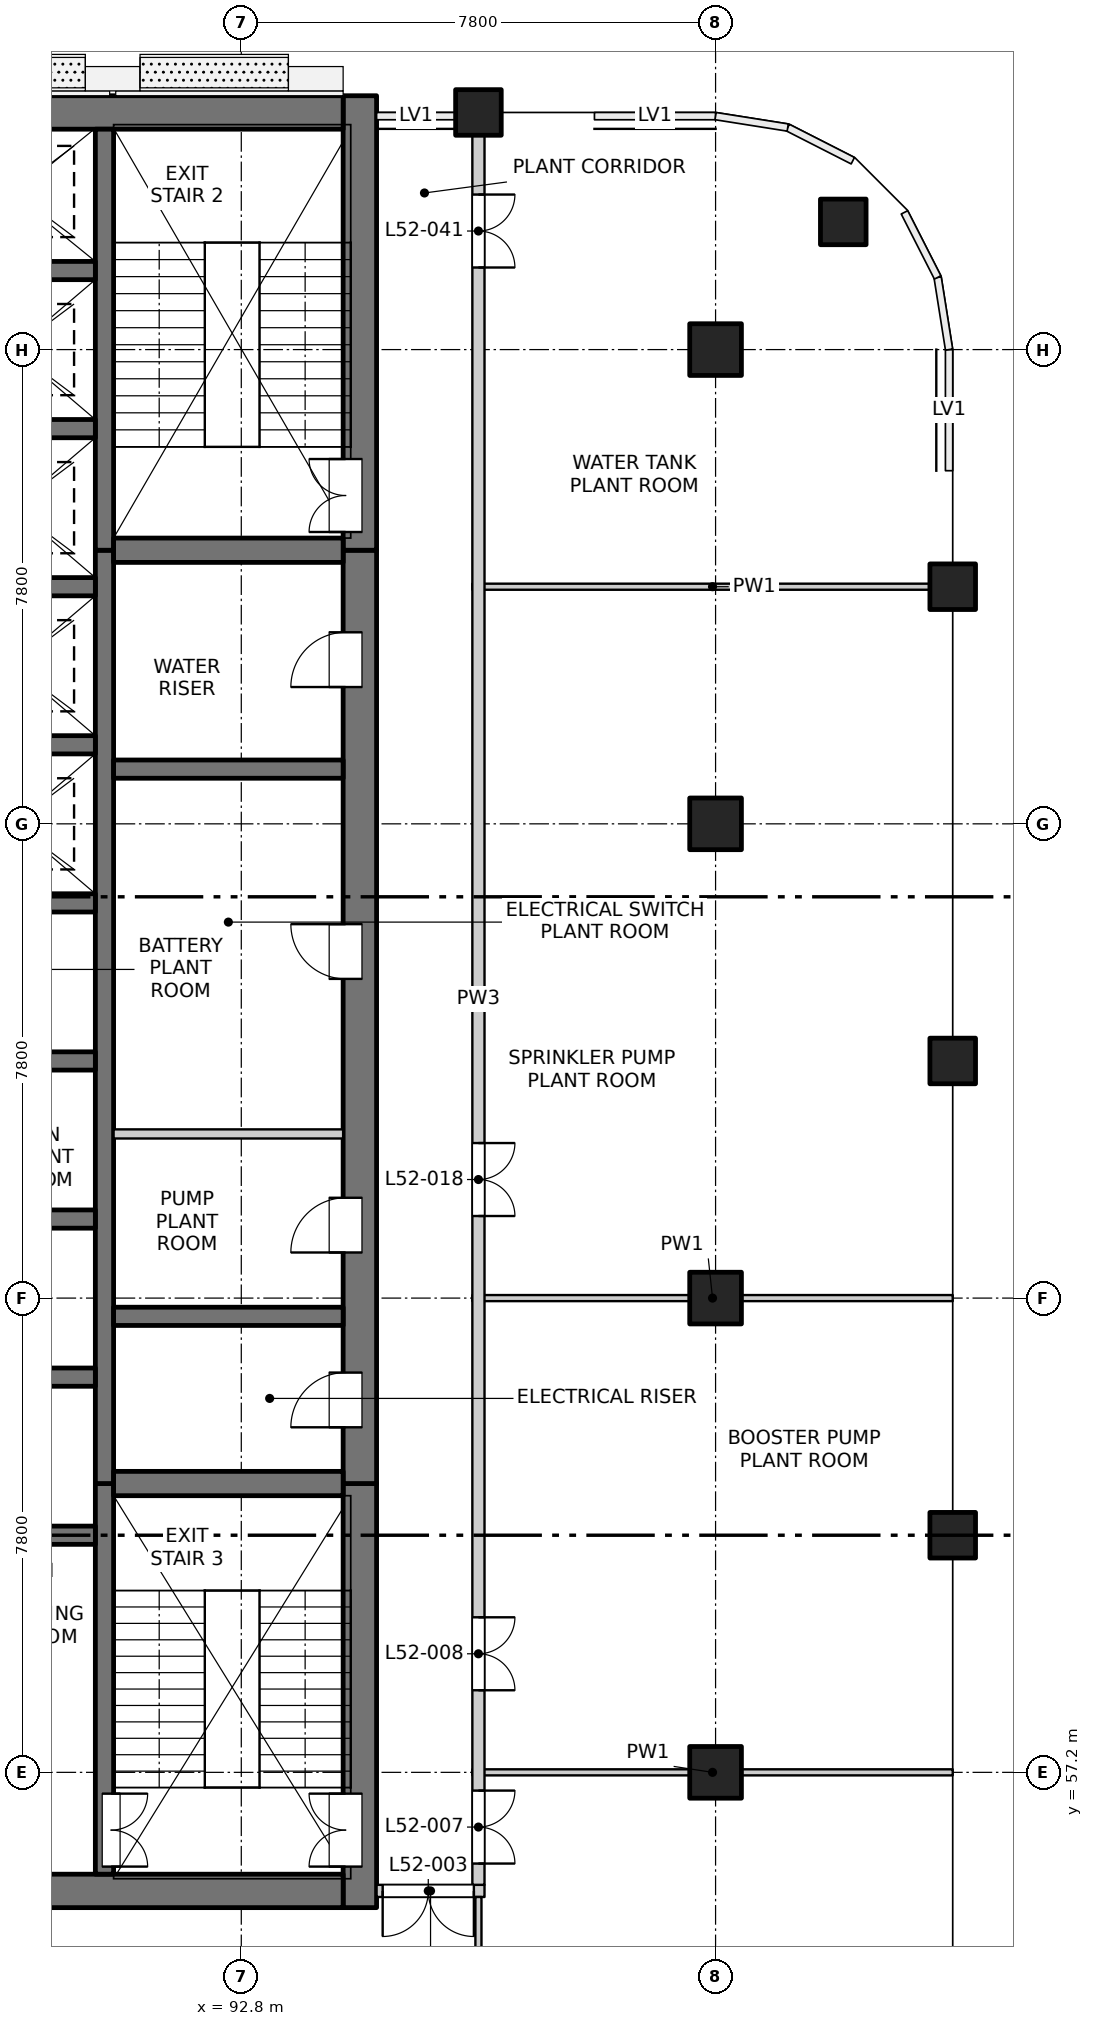
"""IFC4 building model, lengths in metres.
Left out: names, types, materials, properties, quantities, classifications, styles, units other than length and angle.
Written with IfcOpenShell. Run it as: python <this file> out.ifc"""

import sys

from ifc_helpers import new_model, si_unit, direction, frame, frame_2d, origin, origin_2d, place, context, subcontext, project, spatial, rectangle, extrude, element, fill, save


model = new_model("IFC4")
c1 = context("Model", 3, precision=1e-05, world=origin(), true_north=direction((0.0, 1.0)))
c2 = subcontext(c1, "Body", "Model", "MODEL_VIEW")
j1 = project(units=[si_unit("LENGTHUNIT", "METRE"), si_unit("PLANEANGLEUNIT", "RADIAN")], contexts=[c1])
p1 = place(None, origin())
s1 = spatial("IfcSite", under=j1, at=p1, CompositionType="ELEMENT")
p2 = place(p1, origin())
s2 = spatial("IfcBuilding", under=s1, at=p2, CompositionType="ELEMENT")
p3 = place(p2, frame((0.0, 0.0, 192.8)))
s3 = spatial("IfcBuildingStorey", under=s2, at=p3, CompositionType="ELEMENT", Elevation=192.8)
for number, where, z_axis, x_axis in (
    (1, (102.7, 82.7, -0.3), (0.0, 0.0, 1.0), (1.0, 0.0, 0.0)),
    (2, (104.5, 61.1, -0.3), (0.0, 0.0, 1.0), (1.0, 0.0, 0.0)),
    (3, (104.5, 68.9, -0.3), (0.0, 0.0, 1.0), (1.0, 0.0, 0.0)),
    (4, (104.5, 76.7, -0.3), (0.0, 0.0, 1.0), (1.0, 0.0, 0.0)),
    (5, (96.7, 84.5, -0.3), (0.0, 0.0, 1.0), (1.0, 0.0, 0.0)),
):
    element("IfcColumn", number, at=place(p3, frame(where, z_axis=z_axis, x_axis=x_axis)), inside=s3, PredefinedType="COLUMN", context=c2, shape_type="SweptSolid", body=[
        extrude(rectangle(XDim=0.75, YDim=0.75, at=origin_2d()), origin(), (0.0, 0.0, 1.0), 4.5),
    ])
for number, where, z_axis, x_axis in (
    (6, (100.6, 57.2, -0.3), (0.0, 0.0, 1.0), (1.0, 0.0, 0.0)),
    (7, (100.6, 65.0, -0.3), (0.0, 0.0, 1.0), (1.0, 0.0, 0.0)),
    (8, (100.6, 72.8, -0.3), (0.0, 0.0, 1.0), (1.0, 0.0, 0.0)),
    (9, (100.6, 80.6, -0.3), (0.0, 0.0, 1.0), (1.0, 0.0, 0.0)),
):
    element("IfcColumn", number, at=place(p3, frame(where, z_axis=z_axis, x_axis=x_axis)), inside=s3, PredefinedType="COLUMN", context=c2, shape_type="SweptSolid", body=[
        extrude(rectangle(XDim=0.85, YDim=0.85, at=origin_2d()), origin(), (0.0, 0.0, 1.0), 4.5),
    ])
p4 = place(p3, frame((94.75, 54.975, -0.3), z_axis=(0.0, 0.0, 1.0), x_axis=(0.0, 1.0, 0.0)))
e10 = element("IfcWall", 10, at=p4, inside=s3, PredefinedType="SOLIDWALL", context=c2, shape_type="SweptSolid", body=[
    extrude(rectangle(XDim=6.975, YDim=0.55, at=frame_2d((3.487, 0.0))), origin(), (0.0, 0.0, 1.0), 4.5),
])
p5 = place(p4, frame((0.675, 0.0, 0.3)))
e11 = element("IfcOpeningElement", 11, at=p5, cuts=e10, PredefinedType="OPENING", context=c2, shape_type="SweptSolid", body=[
    extrude(rectangle(XDim=1.2, YDim=2.1, at=frame_2d((0.6, 1.05))), frame((0.0, 0.285, 0.0), z_axis=(0.0, -1.0, 0.0), x_axis=(1.0, 0.0, 0.0)), (0.0, 0.0, 1.0), 0.57),
])
p6 = place(p3, frame((94.75, 61.95, -0.3), z_axis=(0.0, 0.0, 1.0), x_axis=(0.0, 1.0, 0.0)))
e12 = element("IfcWall", 12, at=p6, inside=s3, PredefinedType="SOLIDWALL", context=c2, shape_type="SweptSolid", body=[
    extrude(rectangle(XDim=15.35, YDim=0.55, at=frame_2d((7.675, 0.0))), origin(), (0.0, 0.0, 1.0), 4.5),
])
p7 = place(p6, frame((0.925, 0.0, 0.3)))
e13 = element("IfcOpeningElement", 13, at=p7, cuts=e12, PredefinedType="OPENING", context=c2, shape_type="SweptSolid", body=[
    extrude(rectangle(XDim=0.9, YDim=2.1, at=frame_2d((0.45, 1.05))), frame((0.0, 0.285, 0.0), z_axis=(0.0, -1.0, 0.0), x_axis=(1.0, 0.0, 0.0)), (0.0, 0.0, 1.0), 0.57),
])
p8 = place(p6, frame((3.8, 0.0, 0.3)))
e14 = element("IfcOpeningElement", 14, at=p8, cuts=e12, PredefinedType="OPENING", context=c2, shape_type="SweptSolid", body=[
    extrude(rectangle(XDim=0.9, YDim=2.1, at=frame_2d((0.45, 1.05))), frame((0.0, 0.285, 0.0), z_axis=(0.0, -1.0, 0.0), x_axis=(1.0, 0.0, 0.0)), (0.0, 0.0, 1.0), 0.57),
])
p9 = place(p6, frame((8.3, 0.0, 0.3)))
e15 = element("IfcOpeningElement", 15, at=p9, cuts=e12, PredefinedType="OPENING", context=c2, shape_type="SweptSolid", body=[
    extrude(rectangle(XDim=0.9, YDim=2.1, at=frame_2d((0.45, 1.05))), frame((0.0, 0.285, 0.0), z_axis=(0.0, -1.0, 0.0), x_axis=(1.0, 0.0, 0.0)), (0.0, 0.0, 1.0), 0.57),
])
p10 = place(p6, frame((13.1, 0.0, 0.3)))
e16 = element("IfcOpeningElement", 16, at=p10, cuts=e12, PredefinedType="OPENING", context=c2, shape_type="SweptSolid", body=[
    extrude(rectangle(XDim=0.9, YDim=2.1, at=frame_2d((0.45, 1.05))), frame((0.0, 0.285, 0.0), z_axis=(0.0, -1.0, 0.0), x_axis=(1.0, 0.0, 0.0)), (0.0, 0.0, 1.0), 0.57),
])
p11 = place(p3, frame((94.75, 77.3, -0.3), z_axis=(0.0, 0.0, 1.0), x_axis=(0.0, 1.0, 0.0)))
e17 = element("IfcWall", 17, at=p11, inside=s3, PredefinedType="SOLIDWALL", context=c2, shape_type="SweptSolid", body=[
    extrude(rectangle(XDim=7.475, YDim=0.55, at=frame_2d((3.737, 0.0))), origin(), (0.0, 0.0, 1.0), 4.5),
])
p12 = place(p11, frame((0.3, 0.0, 0.3)))
e18 = element("IfcOpeningElement", 18, at=p12, cuts=e17, PredefinedType="OPENING", context=c2, shape_type="SweptSolid", body=[
    extrude(rectangle(XDim=1.2, YDim=2.1, at=frame_2d((0.6, 1.05))), frame((0.0, 0.285, 0.0), z_axis=(0.0, -1.0, 0.0), x_axis=(1.0, 0.0, 0.0)), (0.0, 0.0, 1.0), 0.57),
])
p13 = place(p3, frame((75.525, 55.25, -0.3), z_axis=(0.0, 0.0, 1.0), x_axis=(1.0, 0.0, 0.0)))
e19 = element("IfcWall", 19, at=p13, inside=s3, PredefinedType="SOLIDWALL", context=c2, shape_type="SweptSolid", body=[
    extrude(rectangle(XDim=18.95, YDim=0.55, at=frame_2d((9.475, 0.0))), origin(), (0.0, 0.0, 1.0), 4.5),
])
p14 = place(p13, frame((7.225, 0.0, 0.3)))
e20 = element("IfcOpeningElement", 20, at=p14, cuts=e19, PredefinedType="OPENING", context=c2, shape_type="SweptSolid", body=[
    extrude(rectangle(XDim=1.5, YDim=2.1, at=frame_2d((0.75, 1.05))), frame((0.0, 0.285, 0.0), z_axis=(0.0, -1.0, 0.0), x_axis=(1.0, 0.0, 0.0)), (0.0, 0.0, 1.0), 0.57),
])
p15 = place(p3, frame((75.525, 84.5, -0.3), z_axis=(0.0, 0.0, 1.0), x_axis=(1.0, 0.0, 0.0)))
e21 = element("IfcWall", 21, at=p15, inside=s3, PredefinedType="SOLIDWALL", context=c2, shape_type="SweptSolid", body=[
    extrude(rectangle(XDim=18.95, YDim=0.55, at=frame_2d((9.475, 0.0))), origin(), (0.0, 0.0, 1.0), 4.5),
])
p16 = place(p3, frame((90.55, 55.525, -0.3), z_axis=(0.0, 0.0, 1.0), x_axis=(0.0, 1.0, 0.0)))
e22 = element("IfcWall", 22, at=p16, inside=s3, PredefinedType="SOLIDWALL", context=c2, shape_type="SweptSolid", body=[
    extrude(rectangle(XDim=6.425, YDim=0.3, at=frame_2d((3.212, 0.0))), origin(), (0.0, 0.0, 1.0), 4.5),
])
p17 = place(p16, frame((0.125, 0.0, 0.3)))
e23 = element("IfcOpeningElement", 23, at=p17, cuts=e22, PredefinedType="OPENING", context=c2, shape_type="SweptSolid", body=[
    extrude(rectangle(XDim=1.2, YDim=2.1, at=frame_2d((0.6, 1.05))), frame((0.0, 0.16, 0.0), z_axis=(0.0, -1.0, 0.0), x_axis=(1.0, 0.0, 0.0)), (0.0, 0.0, 1.0), 0.32),
])
p18 = place(p3, frame((90.55, 61.95, -0.3), z_axis=(0.0, 0.0, 1.0), x_axis=(0.0, 1.0, 0.0)))
e24 = element("IfcWall", 24, at=p18, inside=s3, PredefinedType="SOLIDWALL", context=c2, shape_type="SweptSolid", body=[
    extrude(rectangle(XDim=15.35, YDim=0.3, at=frame_2d((7.675, 0.0))), origin(), (0.0, 0.0, 1.0), 4.5),
])
p19 = place(p3, frame((90.55, 77.3, -0.3), z_axis=(0.0, 0.0, 1.0), x_axis=(0.0, 1.0, 0.0)))
e25 = element("IfcWall", 25, at=p19, inside=s3, PredefinedType="SOLIDWALL", context=c2, shape_type="SweptSolid", body=[
    extrude(rectangle(XDim=6.925, YDim=0.3, at=frame_2d((3.462, 0.0))), origin(), (0.0, 0.0, 1.0), 4.5),
])
for number, where, z_axis, x_axis in (
    (26, (87.4, 61.1, -0.3), (0.0, 0.0, 1.0), (1.0, 0.0, 0.0)),
    (27, (87.4, 63.7, -0.3), (0.0, 0.0, 1.0), (1.0, 0.0, 0.0)),
    (28, (87.4, 66.3, -0.3), (0.0, 0.0, 1.0), (1.0, 0.0, 0.0)),
    (29, (87.4, 68.9, -0.3), (0.0, 0.0, 1.0), (1.0, 0.0, 0.0)),
    (30, (87.4, 71.5, -0.3), (0.0, 0.0, 1.0), (1.0, 0.0, 0.0)),
    (31, (87.4, 74.1, -0.3), (0.0, 0.0, 1.0), (1.0, 0.0, 0.0)),
    (32, (87.4, 76.7, -0.3), (0.0, 0.0, 1.0), (1.0, 0.0, 0.0)),
    (33, (87.4, 79.3, -0.3), (0.0, 0.0, 1.0), (1.0, 0.0, 0.0)),
    (34, (87.4, 81.9, -0.3), (0.0, 0.0, 1.0), (1.0, 0.0, 0.0)),
):
    element("IfcWall", number, at=place(p3, frame(where, z_axis=z_axis, x_axis=x_axis)), inside=s3, PredefinedType="SOLIDWALL", context=c2, shape_type="SweptSolid", body=[
        extrude(rectangle(XDim=3.0, YDim=0.3, at=frame_2d((1.5, 0.0))), origin(), (0.0, 0.0, 1.0), 4.5),
    ])
p20 = place(p3, frame((90.7, 61.95, -0.3), z_axis=(0.0, 0.0, 1.0), x_axis=(1.0, 0.0, 0.0)))
e35 = element("IfcWall", 35, at=p20, inside=s3, PredefinedType="SOLIDWALL", context=c2, shape_type="SweptSolid", body=[
    extrude(rectangle(XDim=3.775, YDim=0.4, at=frame_2d((1.888, 0.0))), origin(), (0.0, 0.0, 1.0), 4.5),
])
for number, where, z_axis, x_axis in (
    (36, (90.7, 64.7, -0.3), (0.0, 0.0, 1.0), (1.0, 0.0, 0.0)),
    (37, (90.7, 73.7, -0.3), (0.0, 0.0, 1.0), (1.0, 0.0, 0.0)),
):
    element("IfcWall", number, at=place(p3, frame(where, z_axis=z_axis, x_axis=x_axis)), inside=s3, PredefinedType="SOLIDWALL", context=c2, shape_type="SweptSolid", body=[
        extrude(rectangle(XDim=3.775, YDim=0.3, at=frame_2d((1.888, 0.0))), origin(), (0.0, 0.0, 1.0), 4.5),
    ])
p21 = place(p3, frame((90.7, 77.3, -0.3), z_axis=(0.0, 0.0, 1.0), x_axis=(1.0, 0.0, 0.0)))
e38 = element("IfcWall", 38, at=p21, inside=s3, PredefinedType="SOLIDWALL", context=c2, shape_type="SweptSolid", body=[
    extrude(rectangle(XDim=3.775, YDim=0.4, at=frame_2d((1.888, 0.0))), origin(), (0.0, 0.0, 1.0), 4.5),
])
p22 = place(p3, frame((95.025, 55.25, 0.0), z_axis=(0.0, 0.0, 1.0), x_axis=(1.0, 0.0, 0.0)))
e39 = element("IfcWall", 39, at=p22, inside=s3, PredefinedType="PARTITIONING", context=c2, shape_type="SweptSolid", body=[
    extrude(rectangle(XDim=1.775, YDim=0.2, at=frame_2d((0.887, 0.0))), origin(), (0.0, 0.0, 1.0), 4.2),
])
p23 = place(p22, frame((0.1, 0.0, 0.0)))
e40 = element("IfcOpeningElement", 40, at=p23, cuts=e39, PredefinedType="OPENING", context=c2, shape_type="SweptSolid", body=[
    extrude(rectangle(XDim=1.5, YDim=2.1, at=frame_2d((0.75, 1.05))), frame((0.0, 0.11, 0.0), z_axis=(0.0, -1.0, 0.0), x_axis=(1.0, 0.0, 0.0)), (0.0, 0.0, 1.0), 0.22),
])
for number, where, z_axis, x_axis in (
    (41, (96.6, 57.2, 0.0), (0.0, 0.0, 1.0), (1.0, 0.0, 0.0)),
    (42, (96.6, 65.0, 0.0), (0.0, 0.0, 1.0), (1.0, 0.0, 0.0)),
):
    element("IfcWall", number, at=place(p3, frame(where, z_axis=z_axis, x_axis=x_axis)), inside=s3, PredefinedType="PARTITIONING", context=c2, shape_type="SweptSolid", body=[
        extrude(rectangle(XDim=7.9, YDim=0.1, at=frame_2d((3.95, 0.0))), origin(), (0.0, 0.0, 1.0), 4.2),
    ])
p24 = place(p3, frame((90.7, 67.7, 0.0), z_axis=(0.0, 0.0, 1.0), x_axis=(1.0, 0.0, 0.0)))
e43 = element("IfcWall", 43, at=p24, inside=s3, PredefinedType="PARTITIONING", context=c2, shape_type="SweptSolid", body=[
    extrude(rectangle(XDim=3.775, YDim=0.15, at=frame_2d((1.887, 0.0))), origin(), (0.0, 0.0, 1.0), 4.2),
])
p25 = place(p3, frame((96.6, 76.7, 0.0), z_axis=(0.0, 0.0, 1.0), x_axis=(1.0, 0.0, 0.0)))
e44 = element("IfcWall", 44, at=p25, inside=s3, PredefinedType="PARTITIONING", context=c2, shape_type="SweptSolid", body=[
    extrude(rectangle(XDim=7.9, YDim=0.1, at=frame_2d((3.95, 0.0))), origin(), (0.0, 0.0, 1.0), 3.6),
])
p26 = place(p3, frame((96.7, 45.5, 0.0), z_axis=(0.0, 0.0, 1.0), x_axis=(0.0, 1.0, 0.0)))
e45 = element("IfcWall", 45, at=p26, inside=s3, PredefinedType="PARTITIONING", context=c2, shape_type="SweptSolid", body=[
    extrude(rectangle(XDim=9.65, YDim=0.1, at=frame_2d((4.825, 0.0))), origin(), (0.0, 0.0, 1.0), 4.2),
])
p27 = place(p3, frame((96.7, 55.35, 0.0), z_axis=(0.0, 0.0, 1.0), x_axis=(0.0, 1.0, 0.0)))
e46 = element("IfcWall", 46, at=p27, inside=s3, PredefinedType="PARTITIONING", context=c2, shape_type="SweptSolid", body=[
    extrude(rectangle(XDim=29.15, YDim=0.2, at=frame_2d((14.575, 0.0))), origin(), (0.0, 0.0, 1.0), 4.2),
])
p28 = place(p27, frame((0.35, 0.0, 0.0)))
e47 = element("IfcOpeningElement", 47, at=p28, cuts=e46, PredefinedType="OPENING", context=c2, shape_type="SweptSolid", body=[
    extrude(rectangle(XDim=1.2, YDim=2.1, at=frame_2d((0.6, 1.05))), frame((0.0, 0.11, 0.0), z_axis=(0.0, -1.0, 0.0), x_axis=(1.0, 0.0, 0.0)), (0.0, 0.0, 1.0), 0.22),
])
p29 = place(p27, frame((3.2, 0.0, 0.0)))
e48 = element("IfcOpeningElement", 48, at=p29, cuts=e46, PredefinedType="OPENING", context=c2, shape_type="SweptSolid", body=[
    extrude(rectangle(XDim=1.2, YDim=2.1, at=frame_2d((0.6, 1.05))), frame((0.0, 0.11, 0.0), z_axis=(0.0, -1.0, 0.0), x_axis=(1.0, 0.0, 0.0)), (0.0, 0.0, 1.0), 0.22),
])
p30 = place(p27, frame((11.0, 0.0, 0.0)))
e49 = element("IfcOpeningElement", 49, at=p30, cuts=e46, PredefinedType="OPENING", context=c2, shape_type="SweptSolid", body=[
    extrude(rectangle(XDim=1.2, YDim=2.1, at=frame_2d((0.6, 1.05))), frame((0.0, 0.11, 0.0), z_axis=(0.0, -1.0, 0.0), x_axis=(1.0, 0.0, 0.0)), (0.0, 0.0, 1.0), 0.22),
])
p31 = place(p27, frame((26.6, 0.0, 0.0)))
e50 = element("IfcOpeningElement", 50, at=p31, cuts=e46, PredefinedType="OPENING", context=c2, shape_type="SweptSolid", body=[
    extrude(rectangle(XDim=1.2, YDim=2.1, at=frame_2d((0.6, 1.05))), frame((0.0, 0.11, 0.0), z_axis=(0.0, -1.0, 0.0), x_axis=(1.0, 0.0, 0.0)), (0.0, 0.0, 1.0), 0.22),
])
p32 = place(p23, origin())
e51 = element("IfcDoor", 51, at=p32, inside=s3, OperationType="DOUBLE_DOOR_SINGLE_SWING", PredefinedType="DOOR", context=c2, shape_type="SweptSolid", body=[
    extrude(rectangle(XDim=1.5, YDim=2.1, at=frame_2d((0.75, 1.05))), frame((0.0, 0.025, 0.0), z_axis=(0.0, -1.0, 0.0), x_axis=(1.0, 0.0, 0.0)), (0.0, 0.0, 1.0), 0.05),
])
fill(e40, e51)
p33 = place(p17, origin())
e52 = element("IfcDoor", 52, at=p33, inside=s3, OperationType="DOUBLE_DOOR_SINGLE_SWING", PredefinedType="DOOR", context=c2, shape_type="SweptSolid", body=[
    extrude(rectangle(XDim=1.2, YDim=2.1, at=frame_2d((0.6, 1.05))), frame((0.0, -0.085, 0.0), z_axis=(0.0, -1.0, 0.0), x_axis=(1.0, 0.0, 0.0)), (0.0, 0.0, 1.0), 0.05),
])
fill(e23, e52)
p34 = place(p5, origin())
e53 = element("IfcDoor", 53, at=p34, inside=s3, OperationType="DOUBLE_DOOR_SINGLE_SWING", PredefinedType="DOOR", context=c2, shape_type="SweptSolid", body=[
    extrude(rectangle(XDim=1.2, YDim=2.1, at=frame_2d((0.6, 1.05))), frame((0.0, 0.26, 0.0), z_axis=(0.0, -1.0, 0.0), x_axis=(1.0, 0.0, 0.0)), (0.0, 0.0, 1.0), 0.05),
])
fill(e11, e53)
p35 = place(p28, origin())
e54 = element("IfcDoor", 54, at=p35, inside=s3, OperationType="DOUBLE_DOOR_SINGLE_SWING", PredefinedType="DOOR", context=c2, shape_type="SweptSolid", body=[
    extrude(rectangle(XDim=1.2, YDim=2.1, at=frame_2d((0.6, 1.05))), frame((0.0, 0.025, 0.0), z_axis=(0.0, -1.0, 0.0), x_axis=(1.0, 0.0, 0.0)), (0.0, 0.0, 1.0), 0.05),
])
fill(e47, e54)
p36 = place(p29, origin())
e55 = element("IfcDoor", 55, at=p36, inside=s3, OperationType="DOUBLE_DOOR_SINGLE_SWING", PredefinedType="DOOR", context=c2, shape_type="SweptSolid", body=[
    extrude(rectangle(XDim=1.2, YDim=2.1, at=frame_2d((0.6, 1.05))), frame((0.0, 0.025, 0.0), z_axis=(0.0, -1.0, 0.0), x_axis=(1.0, 0.0, 0.0)), (0.0, 0.0, 1.0), 0.05),
])
fill(e48, e55)
p37 = place(p7, origin())
e56 = element("IfcDoor", 56, at=p37, inside=s3, OperationType="SINGLE_SWING_LEFT", PredefinedType="DOOR", context=c2, shape_type="SweptSolid", body=[
    extrude(rectangle(XDim=0.9, YDim=2.1, at=frame_2d((0.45, 1.05))), frame((0.0, 0.26, 0.0), z_axis=(0.0, -1.0, 0.0), x_axis=(1.0, 0.0, 0.0)), (0.0, 0.0, 1.0), 0.05),
])
fill(e13, e56)
p38 = place(p8, origin())
e57 = element("IfcDoor", 57, at=p38, inside=s3, OperationType="SINGLE_SWING_LEFT", PredefinedType="DOOR", context=c2, shape_type="SweptSolid", body=[
    extrude(rectangle(XDim=0.9, YDim=2.1, at=frame_2d((0.45, 1.05))), frame((0.0, 0.26, 0.0), z_axis=(0.0, -1.0, 0.0), x_axis=(1.0, 0.0, 0.0)), (0.0, 0.0, 1.0), 0.05),
])
fill(e14, e57)
p39 = place(p30, origin())
e58 = element("IfcDoor", 58, at=p39, inside=s3, OperationType="DOUBLE_DOOR_SINGLE_SWING", PredefinedType="DOOR", context=c2, shape_type="SweptSolid", body=[
    extrude(rectangle(XDim=1.2, YDim=2.1, at=frame_2d((0.6, 1.05))), frame((0.0, 0.025, 0.0), z_axis=(0.0, -1.0, 0.0), x_axis=(1.0, 0.0, 0.0)), (0.0, 0.0, 1.0), 0.05),
])
fill(e49, e58)
p40 = place(p9, origin())
e59 = element("IfcDoor", 59, at=p40, inside=s3, OperationType="SINGLE_SWING_RIGHT", PredefinedType="DOOR", context=c2, shape_type="SweptSolid", body=[
    extrude(rectangle(XDim=0.9, YDim=2.1, at=frame_2d((0.45, 1.05))), frame((0.0, 0.26, 0.0), z_axis=(0.0, -1.0, 0.0), x_axis=(1.0, 0.0, 0.0)), (0.0, 0.0, 1.0), 0.05),
])
fill(e15, e59)
p41 = place(p10, origin())
e60 = element("IfcDoor", 60, at=p41, inside=s3, OperationType="SINGLE_SWING_LEFT", PredefinedType="DOOR", context=c2, shape_type="SweptSolid", body=[
    extrude(rectangle(XDim=0.9, YDim=2.1, at=frame_2d((0.45, 1.05))), frame((0.0, 0.26, 0.0), z_axis=(0.0, -1.0, 0.0), x_axis=(1.0, 0.0, 0.0)), (0.0, 0.0, 1.0), 0.05),
])
fill(e16, e60)
p42 = place(p12, origin())
e61 = element("IfcDoor", 61, at=p42, inside=s3, OperationType="DOUBLE_DOOR_SINGLE_SWING", PredefinedType="DOOR", context=c2, shape_type="SweptSolid", body=[
    extrude(rectangle(XDim=1.2, YDim=2.1, at=frame_2d((0.6, 1.05))), frame((0.0, 0.26, 0.0), z_axis=(0.0, -1.0, 0.0), x_axis=(1.0, 0.0, 0.0)), (0.0, 0.0, 1.0), 0.05),
])
fill(e18, e61)
p43 = place(p31, origin())
e62 = element("IfcDoor", 62, at=p43, inside=s3, OperationType="DOUBLE_DOOR_SINGLE_SWING", PredefinedType="DOOR", context=c2, shape_type="SweptSolid", body=[
    extrude(rectangle(XDim=1.2, YDim=2.1, at=frame_2d((0.6, 1.05))), frame((0.0, 0.025, 0.0), z_axis=(0.0, -1.0, 0.0), x_axis=(1.0, 0.0, 0.0)), (0.0, 0.0, 1.0), 0.05),
])
fill(e50, e62)
save(model, sys.argv[1])
